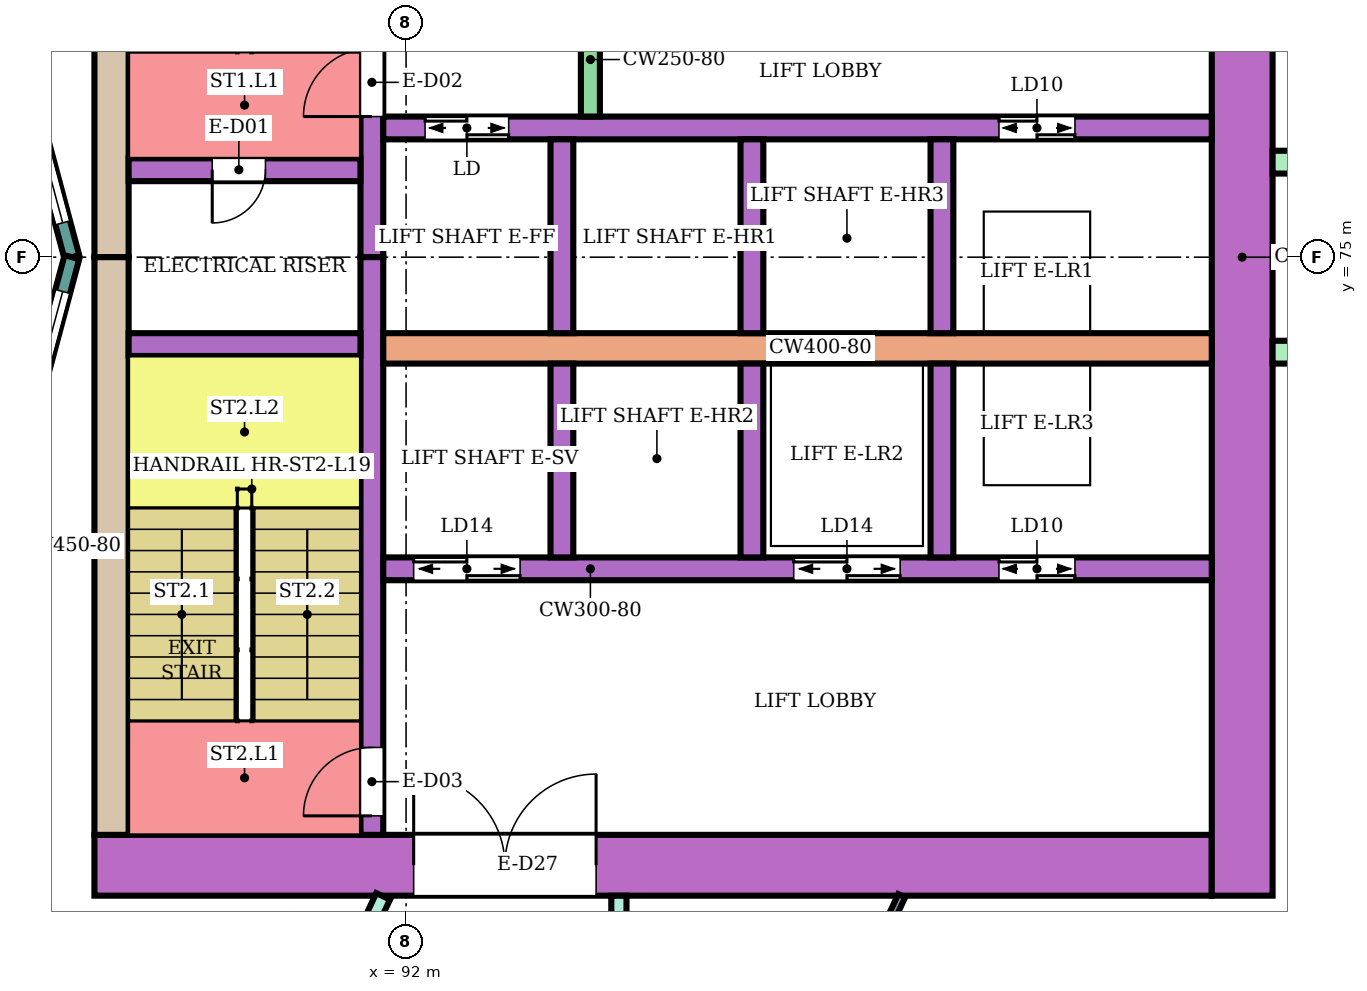
"""IFC4 building model, lengths in metres.
Left out: names, types, materials, properties, quantities, classifications, styles, units other than length and angle.
Written with IfcOpenShell. Run it as: python <this file> out.ifc"""

import sys

from ifc_helpers import new_model, si_unit, direction, frame, frame_2d, origin, place, context, subcontext, project, spatial, rectangle, extrude, element, fill, save


model = new_model("IFC4")
c1 = context("Model", 3, precision=1e-05, world=origin(), true_north=direction((0.0, 1.0)))
c2 = subcontext(c1, "Body", "Model", "MODEL_VIEW")
j1 = project(units=[si_unit("LENGTHUNIT", "METRE"), si_unit("PLANEANGLEUNIT", "RADIAN")], contexts=[c1])
p1 = place(None, origin())
s1 = spatial("IfcSite", under=j1, at=p1, CompositionType="ELEMENT")
p2 = place(p1, origin())
s2 = spatial("IfcBuilding", under=s1, at=p2, CompositionType="ELEMENT")
p3 = place(p2, frame((0.0, 0.0, 86.2)))
s3 = spatial("IfcBuildingStorey", under=s2, at=p3, CompositionType="ELEMENT", Elevation=86.2)
p4 = place(p3, frame((87.9, 67.0, 0.0), z_axis=(0.0, 0.0, 1.0), x_axis=(1.0, 0.0, 0.0)))
e1 = element("IfcWall", 1, at=p4, inside=s3, PredefinedType="SHEAR", context=c2, shape_type="SweptSolid", body=[
    extrude(rectangle(XDim=14.7, YDim=0.8, at=frame_2d((7.35, 0.0))), origin(), (0.0, 0.0, 1.0), 3.48),
])
p5 = place(p4, frame((4.2, 0.0, 0.0)))
e2 = element("IfcOpeningElement", 2, at=p5, cuts=e1, PredefinedType="OPENING", context=c2, shape_type="SweptSolid", body=[
    extrude(rectangle(XDim=2.4, YDim=2.4, at=frame_2d((1.2, 1.2))), frame((0.0, 0.41, 0.0), z_axis=(0.0, -1.0, 0.0), x_axis=(1.0, 0.0, 0.0)), (0.0, 0.0, 1.0), 0.82),
])
for number, where, z_axis, x_axis in (
    (3, (88.125, 75.0, 0.0), (0.0, 0.0, 1.0), (0.0, 1.0, 0.0)),
    (4, (88.125, 67.4, 0.0), (0.0, 0.0, 1.0), (0.0, 1.0, 0.0)),
):
    element("IfcWall", number, at=place(p3, frame(where, z_axis=z_axis, x_axis=x_axis)), inside=s3, PredefinedType="SHEAR", context=c2, shape_type="SweptSolid", body=[
        extrude(rectangle(XDim=7.6, YDim=0.45, at=frame_2d((3.8, 0.0))), origin(), (0.0, 0.0, 1.0), 3.48),
    ])
p6 = place(p3, frame((103.0, 66.6, 0.0), z_axis=(0.0, 0.0, 1.0), x_axis=(0.0, 1.0, 0.0)))
e5 = element("IfcWall", 5, at=p6, inside=s3, PredefinedType="SHEAR", context=c2, shape_type="SweptSolid", body=[
    extrude(rectangle(XDim=16.8, YDim=0.8, at=frame_2d((8.4, 0.0))), origin(), (0.0, 0.0, 1.0), 3.48),
])
p7 = place(p3, frame((91.55, 75.0, 0.0), z_axis=(0.0, 0.0, 1.0), x_axis=(0.0, 1.0, 0.0)))
e6 = element("IfcWall", 6, at=p7, inside=s3, PredefinedType="SHEAR", context=c2, shape_type="SweptSolid", body=[
    extrude(rectangle(XDim=7.6, YDim=0.3, at=frame_2d((3.8, 0.0))), origin(), (0.0, 0.0, 1.0), 3.48),
])
p8 = place(p7, frame((1.85, 0.0, 0.0)))
e7 = element("IfcOpeningElement", 7, at=p8, cuts=e6, PredefinedType="OPENING", context=c2, shape_type="SweptSolid", body=[
    extrude(rectangle(XDim=0.9, YDim=2.1, at=frame_2d((0.45, 1.05))), frame((0.0, 0.16, 0.0), z_axis=(0.0, -1.0, 0.0), x_axis=(1.0, 0.0, 0.0)), (0.0, 0.0, 1.0), 0.32),
])
p9 = place(p3, frame((91.55, 67.4, 0.0), z_axis=(0.0, 0.0, 1.0), x_axis=(0.0, 1.0, 0.0)))
e8 = element("IfcWall", 8, at=p9, inside=s3, PredefinedType="SHEAR", context=c2, shape_type="SweptSolid", body=[
    extrude(rectangle(XDim=7.6, YDim=0.3, at=frame_2d((3.8, 0.0))), origin(), (0.0, 0.0, 1.0), 3.48),
])
p10 = place(p9, frame((0.25, 0.0, 0.0)))
e9 = element("IfcOpeningElement", 9, at=p10, cuts=e8, PredefinedType="OPENING", context=c2, shape_type="SweptSolid", body=[
    extrude(rectangle(XDim=0.9, YDim=2.1, at=frame_2d((0.45, 1.05))), frame((0.0, 0.16, 0.0), z_axis=(0.0, -1.0, 0.0), x_axis=(1.0, 0.0, 0.0)), (0.0, 0.0, 1.0), 0.32),
])
p11 = place(p3, frame((88.35, 76.15, 0.0), z_axis=(0.0, 0.0, 1.0), x_axis=(1.0, 0.0, 0.0)))
e10 = element("IfcWall", 10, at=p11, inside=s3, PredefinedType="SHEAR", context=c2, shape_type="SweptSolid", body=[
    extrude(rectangle(XDim=3.05, YDim=0.3, at=frame_2d((1.525, 0.0))), origin(), (0.0, 0.0, 1.0), 3.48),
])
p12 = place(p11, frame((1.1, 0.0, 0.0)))
e11 = element("IfcOpeningElement", 11, at=p12, cuts=e10, PredefinedType="OPENING", context=c2, shape_type="SweptSolid", body=[
    extrude(rectangle(XDim=0.7, YDim=2.0, at=frame_2d((0.35, 1.0))), frame((0.0, 0.16, 0.0), z_axis=(0.0, -1.0, 0.0), x_axis=(1.0, 0.0, 0.0)), (0.0, 0.0, 1.0), 0.32),
])
p13 = place(p3, frame((88.35, 73.85, 0.0), z_axis=(0.0, 0.0, 1.0), x_axis=(1.0, 0.0, 0.0)))
e12 = element("IfcWall", 12, at=p13, inside=s3, PredefinedType="SHEAR", context=c2, shape_type="SweptSolid", body=[
    extrude(rectangle(XDim=3.05, YDim=0.3, at=frame_2d((1.525, 0.0))), origin(), (0.0, 0.0, 1.0), 3.48),
])
p14 = place(p3, frame((91.7, 76.7, 0.0), z_axis=(0.0, 0.0, 1.0), x_axis=(1.0, 0.0, 0.0)))
e13 = element("IfcWall", 13, at=p14, inside=s3, PredefinedType="SHEAR", context=c2, shape_type="SweptSolid", body=[
    extrude(rectangle(XDim=10.9, YDim=0.3, at=frame_2d((5.45, 0.0))), origin(), (0.0, 0.0, 1.0), 3.48),
])
p15 = place(p14, frame((0.55, 0.0, 0.0)))
e14 = element("IfcOpeningElement", 14, at=p15, cuts=e13, PredefinedType="OPENING", context=c2, shape_type="SweptSolid", body=[
    extrude(rectangle(XDim=1.1, YDim=2.1, at=frame_2d((0.55, 1.05))), frame((0.0, 0.16, 0.0), z_axis=(0.0, -1.0, 0.0), x_axis=(1.0, 0.0, 0.0)), (0.0, 0.0, 1.0), 0.32),
])
p16 = place(p14, frame((8.1, 0.0, 0.0)))
e15 = element("IfcOpeningElement", 15, at=p16, cuts=e13, PredefinedType="OPENING", context=c2, shape_type="SweptSolid", body=[
    extrude(rectangle(XDim=1.0, YDim=2.1, at=frame_2d((0.5, 1.05))), frame((0.0, 0.16, 0.0), z_axis=(0.0, -1.0, 0.0), x_axis=(1.0, 0.0, 0.0)), (0.0, 0.0, 1.0), 0.32),
])
p17 = place(p3, frame((91.7, 73.8, 0.0), z_axis=(0.0, 0.0, 1.0), x_axis=(1.0, 0.0, 0.0)))
e16 = element("IfcWall", 16, at=p17, inside=s3, PredefinedType="SHEAR", context=c2, shape_type="SweptSolid", body=[
    extrude(rectangle(XDim=10.9, YDim=0.4, at=frame_2d((5.45, 0.0))), origin(), (0.0, 0.0, 1.0), 3.48),
])
p18 = place(p3, frame((91.7, 70.9, 0.0), z_axis=(0.0, 0.0, 1.0), x_axis=(1.0, 0.0, 0.0)))
e17 = element("IfcWall", 17, at=p18, inside=s3, PredefinedType="SHEAR", context=c2, shape_type="SweptSolid", body=[
    extrude(rectangle(XDim=10.9, YDim=0.3, at=frame_2d((5.45, 0.0))), origin(), (0.0, 0.0, 1.0), 3.48),
])
p19 = place(p18, frame((0.4, 0.0, 0.0)))
e18 = element("IfcOpeningElement", 18, at=p19, cuts=e17, PredefinedType="OPENING", context=c2, shape_type="SweptSolid", body=[
    extrude(rectangle(XDim=1.4, YDim=2.1, at=frame_2d((0.7, 1.05))), frame((0.0, 0.16, 0.0), z_axis=(0.0, -1.0, 0.0), x_axis=(1.0, 0.0, 0.0)), (0.0, 0.0, 1.0), 0.32),
])
p20 = place(p18, frame((5.4, 0.0, 0.0)))
e19 = element("IfcOpeningElement", 19, at=p20, cuts=e17, PredefinedType="OPENING", context=c2, shape_type="SweptSolid", body=[
    extrude(rectangle(XDim=1.4, YDim=2.1, at=frame_2d((0.7, 1.05))), frame((0.0, 0.16, 0.0), z_axis=(0.0, -1.0, 0.0), x_axis=(1.0, 0.0, 0.0)), (0.0, 0.0, 1.0), 0.32),
])
p21 = place(p18, frame((8.1, 0.0, 0.0)))
e20 = element("IfcOpeningElement", 20, at=p21, cuts=e17, PredefinedType="OPENING", context=c2, shape_type="SweptSolid", body=[
    extrude(rectangle(XDim=1.0, YDim=2.1, at=frame_2d((0.5, 1.05))), frame((0.0, 0.16, 0.0), z_axis=(0.0, -1.0, 0.0), x_axis=(1.0, 0.0, 0.0)), (0.0, 0.0, 1.0), 0.32),
])
for number, where, z_axis, x_axis in (
    (21, (94.05, 74.0, 0.0), (0.0, 0.0, 1.0), (0.0, 1.0, 0.0)),
    (22, (96.55, 74.0, 0.0), (0.0, 0.0, 1.0), (0.0, 1.0, 0.0)),
    (23, (99.05, 74.0, 0.0), (0.0, 0.0, 1.0), (0.0, 1.0, 0.0)),
    (24, (94.05, 71.05, 0.0), (0.0, 0.0, 1.0), (0.0, 1.0, 0.0)),
    (25, (96.55, 71.05, 0.0), (0.0, 0.0, 1.0), (0.0, 1.0, 0.0)),
    (26, (99.05, 71.05, 0.0), (0.0, 0.0, 1.0), (0.0, 1.0, 0.0)),
):
    element("IfcWall", number, at=place(p3, frame(where, z_axis=z_axis, x_axis=x_axis)), inside=s3, PredefinedType="SHEAR", context=c2, shape_type="SweptSolid", body=[
        extrude(rectangle(XDim=2.55, YDim=0.3, at=frame_2d((1.275, 0.0))), origin(), (0.0, 0.0, 1.0), 3.48),
    ])
p22 = place(p3, frame((94.425, 76.85, 0.0), z_axis=(0.0, 0.0, 1.0), x_axis=(0.0, 1.0, 0.0)))
e27 = element("IfcWall", 27, at=p22, inside=s3, PredefinedType="SHEAR", context=c2, shape_type="SweptSolid", body=[
    extrude(rectangle(XDim=1.5, YDim=0.25, at=frame_2d((0.75, 0.0))), origin(), (0.0, 0.0, 1.0), 3.48),
])
for number, where, z_axis, x_axis in (
    (28, (103.4, 73.75, 0.0), (0.0, 0.0, 1.0), (1.0, 0.0, 0.0)),
    (29, (103.4, 76.25, 0.0), (0.0, 0.0, 1.0), (1.0, 0.0, 0.0)),
):
    element("IfcWall", number, at=place(p3, frame(where, z_axis=z_axis, x_axis=x_axis)), inside=s3, PredefinedType="NOTDEFINED", context=c2, shape_type="SweptSolid", body=[
        extrude(rectangle(XDim=2.416, YDim=0.3, at=frame_2d((1.208, 0.0))), origin(), (0.0, 0.0, 1.0), 3.8),
    ])
p23 = place(p3, frame((87.604, 75.0, 0.0), z_axis=(0.0, 0.0, 1.0), x_axis=(-0.258789828301, 0.965933654434, 0.0)))
e30 = element("IfcWall", 30, at=p23, inside=s3, PredefinedType="NOTDEFINED", context=c2, shape_type="SweptSolid", body=[
    extrude(rectangle(XDim=3.936, YDim=0.2, at=frame_2d((1.968, 0.0))), origin(), (0.0, 0.0, 1.0), 3.8),
])
p24 = place(p23, frame((0.468, 0.0, 0.9)))
e31 = element("IfcOpeningElement", 31, at=p24, cuts=e30, PredefinedType="OPENING", context=c2, shape_type="SweptSolid", body=[
    extrude(rectangle(XDim=3.0, YDim=2.3, at=frame_2d((1.5, 1.15))), frame((0.0, 0.11, 0.0), z_axis=(0.0, -1.0, 0.0), x_axis=(1.0, 0.0, 0.0)), (0.0, 0.0, 1.0), 0.22),
])
p25 = place(p3, frame((86.585, 71.198, 0.0), z_axis=(0.0, 0.0, 1.0), x_axis=(0.258789828301, 0.965933654434, 0.0)))
e32 = element("IfcWall", 32, at=p25, inside=s3, PredefinedType="NOTDEFINED", context=c2, shape_type="SweptSolid", body=[
    extrude(rectangle(XDim=3.936, YDim=0.2, at=frame_2d((1.968, 0.0))), origin(), (0.0, 0.0, 1.0), 3.8),
])
p26 = place(p25, frame((0.468, 0.0, 0.9)))
e33 = element("IfcOpeningElement", 33, at=p26, cuts=e32, PredefinedType="OPENING", context=c2, shape_type="SweptSolid", body=[
    extrude(rectangle(XDim=3.0, YDim=2.3, at=frame_2d((1.5, 1.15))), frame((0.0, 0.11, 0.0), z_axis=(0.0, -1.0, 0.0), x_axis=(1.0, 0.0, 0.0)), (0.0, 0.0, 1.0), 0.22),
])
p27 = place(p3, frame((83.846, 68.33, 0.0), z_axis=(0.0, 0.0, 1.0), x_axis=(0.499822319857, -0.866127963163, 0.0)))
e34 = element("IfcWall", 34, at=p27, inside=s3, PredefinedType="PARTITIONING", context=c2, shape_type="SweptSolid", body=[
    extrude(rectangle(XDim=9.382, YDim=0.2, at=frame_2d((4.691, 0.0))), origin(), (0.0, 0.0, 1.0), 3.35),
])
p28 = place(p3, frame((88.501, 59.775, 0.0), z_axis=(0.0, 0.0, 1.0), x_axis=(0.424700525505, 0.905333896215, 0.0)))
e35 = element("IfcWall", 35, at=p28, inside=s3, PredefinedType="PARTITIONING", context=c2, shape_type="SweptSolid", body=[
    extrude(rectangle(XDim=7.53, YDim=0.2, at=frame_2d((3.765, 0.0))), origin(), (0.0, 0.0, 1.0), 3.35),
])
p29 = place(p28, frame((5.83, 0.0, 0.0)))
e36 = element("IfcOpeningElement", 36, at=p29, cuts=e35, PredefinedType="OPENING", context=c2, shape_type="SweptSolid", body=[
    extrude(rectangle(XDim=1.0, YDim=2.1, at=frame_2d((0.5, 1.05))), frame((0.0, 0.11, 0.0), z_axis=(0.0, -1.0, 0.0), x_axis=(1.0, 0.0, 0.0)), (0.0, 0.0, 1.0), 0.22),
])
p30 = place(p3, frame((94.8, 65.1, 0.0), z_axis=(0.0, 0.0, 1.0), x_axis=(0.0, 1.0, 0.0)))
e37 = element("IfcWall", 37, at=p30, inside=s3, PredefinedType="PARTITIONING", context=c2, shape_type="SweptSolid", body=[
    extrude(rectangle(XDim=1.499, YDim=0.2, at=frame_2d((0.75, 0.0))), origin(), (0.0, 0.0, 1.0), 3.35),
])
p31 = place(p3, frame((95.355, 59.806, 0.0), z_axis=(0.0, 0.0, 1.0), x_axis=(0.422407546544, 0.906406015328, 0.0)))
e38 = element("IfcWall", 38, at=p31, inside=s3, PredefinedType="PARTITIONING", context=c2, shape_type="SweptSolid", body=[
    extrude(rectangle(XDim=7.496, YDim=0.1, at=frame_2d((3.748, 0.0))), origin(), (0.0, 0.0, 1.0), 3.35),
])
p32 = place(p31, frame((3.238, 0.0, 0.0)))
e39 = element("IfcOpeningElement", 39, at=p32, cuts=e38, PredefinedType="OPENING", context=c2, shape_type="SweptSolid", body=[
    extrude(rectangle(XDim=0.9, YDim=2.1, at=frame_2d((0.45, 1.05))), frame((0.0, 0.06, 0.0), z_axis=(0.0, -1.0, 0.0), x_axis=(1.0, 0.0, 0.0)), (0.0, 0.0, 1.0), 0.12),
])
p33 = place(p24, origin())
e40 = element("IfcWindow", 40, at=p33, inside=s3, PartitioningType="SINGLE_PANEL", PredefinedType="WINDOW", context=c2, shape_type="SweptSolid", body=[
    extrude(rectangle(XDim=3.0, YDim=2.3, at=frame_2d((1.5, 1.15))), frame((0.0, 0.03, 0.0), z_axis=(0.0, -1.0, 0.0), x_axis=(1.0, 0.0, 0.0)), (0.0, 0.0, 1.0), 0.06),
])
fill(e31, e40)
p34 = place(p26, origin())
e41 = element("IfcWindow", 41, at=p34, inside=s3, PartitioningType="SINGLE_PANEL", PredefinedType="WINDOW", context=c2, shape_type="SweptSolid", body=[
    extrude(rectangle(XDim=3.0, YDim=2.3, at=frame_2d((1.5, 1.15))), frame((0.0, 0.03, 0.0), z_axis=(0.0, -1.0, 0.0), x_axis=(1.0, 0.0, 0.0)), (0.0, 0.0, 1.0), 0.06),
])
fill(e33, e41)
p35 = place(p12, frame((0.7, 0.0, 0.0), z_axis=(0.0, 0.0, 1.0), x_axis=(-1.0, 0.0, 0.0)))
e42 = element("IfcDoor", 42, at=p35, inside=s3, OperationType="SINGLE_SWING_RIGHT", PredefinedType="DOOR", context=c2, shape_type="SweptSolid", body=[
    extrude(rectangle(XDim=0.7, YDim=2.0, at=frame_2d((0.35, 1.0))), frame((0.0, 0.025, 0.0), z_axis=(0.0, -1.0, 0.0), x_axis=(1.0, 0.0, 0.0)), (0.0, 0.0, 1.0), 0.05),
])
fill(e11, e42)
p36 = place(p8, origin())
e43 = element("IfcDoor", 43, at=p36, inside=s3, OperationType="SINGLE_SWING_LEFT", PredefinedType="DOOR", context=c2, shape_type="SweptSolid", body=[
    extrude(rectangle(XDim=0.9, YDim=2.1, at=frame_2d((0.45, 1.05))), frame((0.0, 0.025, 0.0), z_axis=(0.0, -1.0, 0.0), x_axis=(1.0, 0.0, 0.0)), (0.0, 0.0, 1.0), 0.05),
])
fill(e7, e43)
p37 = place(p10, origin())
e44 = element("IfcDoor", 44, at=p37, inside=s3, OperationType="SINGLE_SWING_LEFT", PredefinedType="DOOR", context=c2, shape_type="SweptSolid", body=[
    extrude(rectangle(XDim=0.9, YDim=2.1, at=frame_2d((0.45, 1.05))), frame((0.0, 0.025, 0.0), z_axis=(0.0, -1.0, 0.0), x_axis=(1.0, 0.0, 0.0)), (0.0, 0.0, 1.0), 0.05),
])
fill(e9, e44)
p38 = place(p15, origin())
e45 = element("IfcDoor", 45, at=p38, inside=s3, OperationType="DOUBLE_DOOR_SLIDING", PredefinedType="DOOR", context=c2, shape_type="SweptSolid", body=[
    extrude(rectangle(XDim=1.1, YDim=2.1, at=frame_2d((0.55, 1.05))), frame((0.0, 0.025, 0.0), z_axis=(0.0, -1.0, 0.0), x_axis=(1.0, 0.0, 0.0)), (0.0, 0.0, 1.0), 0.05),
])
fill(e14, e45)
p39 = place(p16, origin())
e46 = element("IfcDoor", 46, at=p39, inside=s3, OperationType="DOUBLE_DOOR_SLIDING", PredefinedType="DOOR", context=c2, shape_type="SweptSolid", body=[
    extrude(rectangle(XDim=1.0, YDim=2.1, at=frame_2d((0.5, 1.05))), frame((0.0, 0.025, 0.0), z_axis=(0.0, -1.0, 0.0), x_axis=(1.0, 0.0, 0.0)), (0.0, 0.0, 1.0), 0.05),
])
fill(e15, e46)
p40 = place(p19, origin())
e47 = element("IfcDoor", 47, at=p40, inside=s3, OperationType="DOUBLE_DOOR_SLIDING", PredefinedType="DOOR", context=c2, shape_type="SweptSolid", body=[
    extrude(rectangle(XDim=1.4, YDim=2.1, at=frame_2d((0.7, 1.05))), frame((0.0, 0.025, 0.0), z_axis=(0.0, -1.0, 0.0), x_axis=(1.0, 0.0, 0.0)), (0.0, 0.0, 1.0), 0.05),
])
fill(e18, e47)
p41 = place(p20, origin())
e48 = element("IfcDoor", 48, at=p41, inside=s3, OperationType="DOUBLE_DOOR_SLIDING", PredefinedType="DOOR", context=c2, shape_type="SweptSolid", body=[
    extrude(rectangle(XDim=1.4, YDim=2.1, at=frame_2d((0.7, 1.05))), frame((0.0, 0.025, 0.0), z_axis=(0.0, -1.0, 0.0), x_axis=(1.0, 0.0, 0.0)), (0.0, 0.0, 1.0), 0.05),
])
fill(e19, e48)
p42 = place(p21, origin())
e49 = element("IfcDoor", 49, at=p42, inside=s3, OperationType="DOUBLE_DOOR_SLIDING", PredefinedType="DOOR", context=c2, shape_type="SweptSolid", body=[
    extrude(rectangle(XDim=1.0, YDim=2.1, at=frame_2d((0.5, 1.05))), frame((0.0, 0.025, 0.0), z_axis=(0.0, -1.0, 0.0), x_axis=(1.0, 0.0, 0.0)), (0.0, 0.0, 1.0), 0.05),
])
fill(e20, e49)
p43 = place(p5, origin())
e50 = element("IfcDoor", 50, at=p43, inside=s3, OperationType="DOUBLE_DOOR_SINGLE_SWING", PredefinedType="DOOR", context=c2, shape_type="SweptSolid", body=[
    extrude(rectangle(XDim=2.4, YDim=2.4, at=frame_2d((1.2, 1.2))), frame((0.0, 0.025, 0.0), z_axis=(0.0, -1.0, 0.0), x_axis=(1.0, 0.0, 0.0)), (0.0, 0.0, 1.0), 0.05),
])
fill(e2, e50)
save(model, sys.argv[1])
